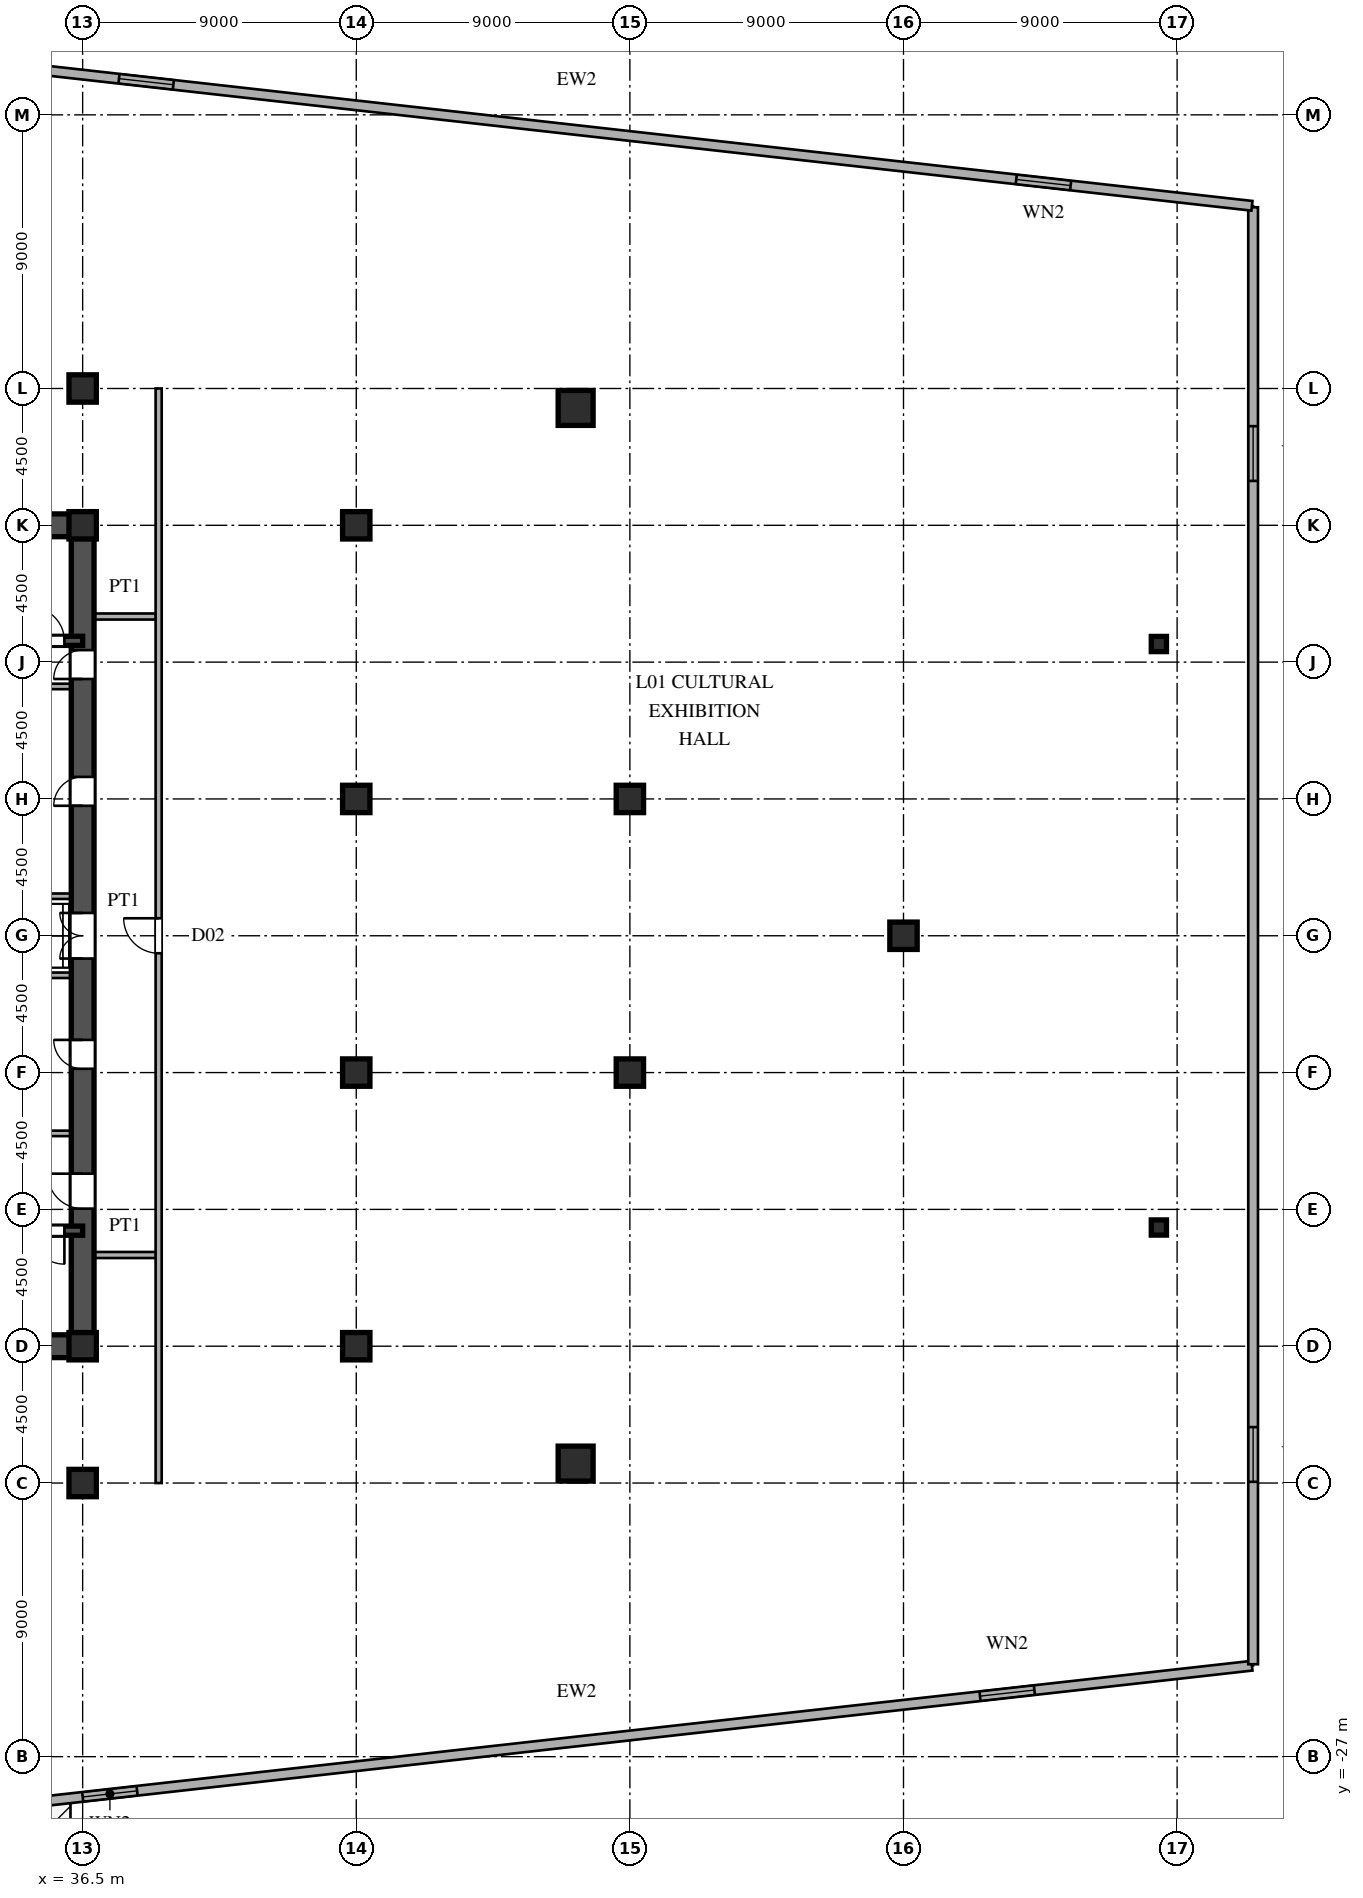
"""IFC4 building model, lengths in metres.
Left out: names, types, materials, properties, quantities, classifications, styles, units other than length and angle.
Written with IfcOpenShell. Run it as: python <this file> out.ifc"""

import sys

from ifc_helpers import new_model, si_unit, direction, frame, frame_2d, origin, origin_2d, place, context, subcontext, project, spatial, rectangle, hollow_rectangle, i_section, extrude, source, transform, mapped, element, fill, save


model = new_model("IFC4")
c1 = context("Model", 3, precision=1e-05, world=origin(), true_north=direction((0.0, 1.0)))
c2 = subcontext(c1, "Body", "Model", "MODEL_VIEW")
j1 = project(units=[si_unit("LENGTHUNIT", "METRE"), si_unit("PLANEANGLEUNIT", "RADIAN")], contexts=[c1])
p1 = place(None, origin())
s1 = spatial("IfcSite", under=j1, at=p1, CompositionType="ELEMENT")
p2 = place(p1, origin())
s2 = spatial("IfcBuilding", under=s1, at=p2, CompositionType="ELEMENT")
p3 = place(p2, frame((0.0, 0.0, 5.4)))
s3 = spatial("IfcBuildingStorey", under=s2, at=p3, CompositionType="ELEMENT", Elevation=5.4)
m1 = source(origin(), c2, "Body", "SweptSolid", [
    extrude(i_section(OverallWidth=0.9, OverallDepth=0.9, WebThickness=0.036, FlangeThickness=0.055, at=origin_2d()), origin(), (0.0, 0.0, 1.0), 4.5),
])
for number, where, z_axis, x_axis in (
    (1, (36.5, -18.0, 0.0), (0.0, 0.0, 1.0), (1.0, 0.0, 0.0)),
    (2, (36.5, -13.5, 0.0), (0.0, 0.0, 1.0), (1.0, 0.0, 0.0)),
    (3, (36.5, 13.5, 0.0), (0.0, 0.0, 1.0), (1.0, 0.0, 0.0)),
    (4, (36.5, 18.0, 0.0), (0.0, 0.0, 1.0), (1.0, 0.0, 0.0)),
    (5, (45.5, -13.5, 0.0), (0.0, 0.0, 1.0), (1.0, 0.0, 0.0)),
    (6, (45.5, -4.5, 0.0), (0.0, 0.0, 1.0), (1.0, 0.0, 0.0)),
    (7, (45.5, 4.5, 0.0), (0.0, 0.0, 1.0), (1.0, 0.0, 0.0)),
    (8, (45.5, 13.5, 0.0), (0.0, 0.0, 1.0), (1.0, 0.0, 0.0)),
    (9, (54.5, -4.5, 0.0), (0.0, 0.0, 1.0), (1.0, 0.0, 0.0)),
    (10, (54.5, 4.5, 0.0), (0.0, 0.0, 1.0), (1.0, 0.0, 0.0)),
    (11, (63.5, 0.0, 0.0), (0.0, 0.0, 1.0), (1.0, 0.0, 0.0)),
):
    element("IfcColumn", number, at=place(p3, frame(where, z_axis=z_axis, x_axis=x_axis)), inside=s3, PredefinedType="COLUMN", context=c2, shape_type="MappedRepresentation", body=[
        mapped(m1, transform((0.0, 0.0, 0.0), scale=1.0)),
    ])
m2 = source(origin(), c2, "Body", "SweptSolid", [
    extrude(hollow_rectangle(XDim=0.5, YDim=0.5, WallThickness=0.02, at=origin_2d()), origin(), (0.0, 0.0, 1.0), 4.5),
])
for number, where, z_axis, x_axis in (
    (12, (71.9, -9.596, 0.0), (0.0, 0.0, 1.0), (1.0, 0.0, 0.0)),
    (13, (71.9, 9.596, 0.0), (0.0, 0.0, 1.0), (1.0, 0.0, 0.0)),
):
    element("IfcColumn", number, at=place(p3, frame(where, z_axis=z_axis, x_axis=x_axis)), inside=s3, PredefinedType="COLUMN", context=c2, shape_type="MappedRepresentation", body=[
        mapped(m2, transform((0.0, 0.0, 0.0), scale=1.0)),
    ])
m3 = source(origin(), c2, "Body", "SweptSolid", [
    extrude(hollow_rectangle(XDim=1.15, YDim=1.15, WallThickness=0.048, at=origin_2d()), origin(), (0.0, 0.0, 1.0), 4.5),
])
for number, where, z_axis, x_axis in (
    (14, (52.716, -17.361, 0.0), (0.0, 0.0, 1.0), (1.0, 0.0, 0.0)),
    (15, (52.716, 17.361, 0.0), (0.0, 0.0, 1.0), (1.0, 0.0, 0.0)),
):
    element("IfcColumn", number, at=place(p3, frame(where, z_axis=z_axis, x_axis=x_axis)), inside=s3, PredefinedType="COLUMN", context=c2, shape_type="MappedRepresentation", body=[
        mapped(m3, transform((0.0, 0.0, 0.0), scale=1.0)),
    ])
p4 = place(p3, frame((30.54, -28.996, 0.0), z_axis=(0.0, 0.0, 1.0), x_axis=(0.993746430789, 0.111660338952, 0.0)))
e16 = element("IfcWall", 16, at=p4, inside=s3, PredefinedType="SOLIDWALL", context=c2, shape_type="SweptSolid", body=[
    extrude(rectangle(XDim=44.7, YDim=0.32, at=frame_2d((22.35, 0.0))), origin(), (0.0, 0.0, 1.0), 4.22),
])
p5 = place(p4, frame((6.0, 0.0, 0.85)))
e17 = element("IfcOpeningElement", 17, at=p5, cuts=e16, PredefinedType="OPENING", context=c2, shape_type="SweptSolid", body=[
    extrude(rectangle(XDim=1.8, YDim=2.0, at=frame_2d((0.9, 1.0))), frame((0.0, 0.17, 0.0), z_axis=(0.0, -1.0, 0.0), x_axis=(1.0, 0.0, 0.0)), (0.0, 0.0, 1.0), 0.34),
])
p6 = place(p4, frame((35.7, 0.0, 0.85)))
e18 = element("IfcOpeningElement", 18, at=p6, cuts=e16, PredefinedType="OPENING", context=c2, shape_type="SweptSolid", body=[
    extrude(rectangle(XDim=1.8, YDim=2.0, at=frame_2d((0.9, 1.0))), frame((0.0, 0.17, 0.0), z_axis=(0.0, -1.0, 0.0), x_axis=(1.0, 0.0, 0.0)), (0.0, 0.0, 1.0), 0.34),
])
p7 = place(p3, frame((75.0, -23.96, 0.0), z_axis=(0.0, 0.0, 1.0), x_axis=(0.0, 1.0, 0.0)))
e19 = element("IfcWall", 19, at=p7, inside=s3, PredefinedType="SOLIDWALL", context=c2, shape_type="SweptSolid", body=[
    extrude(rectangle(XDim=47.92, YDim=0.32, at=frame_2d((23.96, 0.0))), origin(), (0.0, 0.0, 1.0), 4.22),
])
p8 = place(p7, frame((6.0, 0.0, 0.85)))
e20 = element("IfcOpeningElement", 20, at=p8, cuts=e19, PredefinedType="OPENING", context=c2, shape_type="SweptSolid", body=[
    extrude(rectangle(XDim=1.8, YDim=2.0, at=frame_2d((0.9, 1.0))), frame((0.0, 0.17, 0.0), z_axis=(0.0, -1.0, 0.0), x_axis=(1.0, 0.0, 0.0)), (0.0, 0.0, 1.0), 0.34),
])
p9 = place(p7, frame((38.92, 0.0, 0.85)))
e21 = element("IfcOpeningElement", 21, at=p9, cuts=e19, PredefinedType="OPENING", context=c2, shape_type="SweptSolid", body=[
    extrude(rectangle(XDim=1.8, YDim=2.0, at=frame_2d((0.9, 1.0))), frame((0.0, 0.17, 0.0), z_axis=(0.0, -1.0, 0.0), x_axis=(1.0, 0.0, 0.0)), (0.0, 0.0, 1.0), 0.34),
])
p10 = place(p3, frame((74.96, 24.004, 0.0), z_axis=(0.0, 0.0, 1.0), x_axis=(-0.993746430789, 0.111660338952, 0.0)))
e22 = element("IfcWall", 22, at=p10, inside=s3, PredefinedType="SOLIDWALL", context=c2, shape_type="SweptSolid", body=[
    extrude(rectangle(XDim=44.7, YDim=0.32, at=frame_2d((22.35, 0.0))), origin(), (0.0, 0.0, 1.0), 4.22),
])
p11 = place(p10, frame((6.0, 0.0, 0.85)))
e23 = element("IfcOpeningElement", 23, at=p11, cuts=e22, PredefinedType="OPENING", context=c2, shape_type="SweptSolid", body=[
    extrude(rectangle(XDim=1.8, YDim=2.0, at=frame_2d((0.9, 1.0))), frame((0.0, 0.17, 0.0), z_axis=(0.0, -1.0, 0.0), x_axis=(1.0, 0.0, 0.0)), (0.0, 0.0, 1.0), 0.34),
])
p12 = place(p10, frame((35.7, 0.0, 0.85)))
e24 = element("IfcOpeningElement", 24, at=p12, cuts=e22, PredefinedType="OPENING", context=c2, shape_type="SweptSolid", body=[
    extrude(rectangle(XDim=1.8, YDim=2.0, at=frame_2d((0.9, 1.0))), frame((0.0, 0.17, 0.0), z_axis=(0.0, -1.0, 0.0), x_axis=(1.0, 0.0, 0.0)), (0.0, 0.0, 1.0), 0.34),
])
for number, where, z_axis, x_axis in (
    (25, (27.5, -13.5, 0.0), (0.0, 0.0, 1.0), (1.0, 0.0, 0.0)),
    (26, (27.5, 13.5, 0.0), (0.0, 0.0, 1.0), (1.0, 0.0, 0.0)),
):
    element("IfcWall", number, at=place(p3, frame(where, z_axis=z_axis, x_axis=x_axis)), inside=s3, PredefinedType="SHEAR", context=c2, shape_type="SweptSolid", body=[
        extrude(rectangle(XDim=9.0, YDim=0.75, at=frame_2d((4.5, 0.0))), origin(), (0.0, 0.0, 1.0), 4.22),
    ])
p13 = place(p3, frame((36.5, -13.65, 0.0), z_axis=(0.0, 0.0, 1.0), x_axis=(0.0, 1.0, 0.0)))
e27 = element("IfcWall", 27, at=p13, inside=s3, PredefinedType="SHEAR", context=c2, shape_type="SweptSolid", body=[
    extrude(rectangle(XDim=7.15, YDim=0.75, at=frame_2d((3.575, 0.0))), origin(), (0.0, 0.0, 1.0), 4.22),
])
p14 = place(p13, frame((4.675, 0.0, 0.0)))
e28 = element("IfcOpeningElement", 28, at=p14, cuts=e27, PredefinedType="OPENING", context=c2, shape_type="SweptSolid", body=[
    extrude(rectangle(XDim=1.15, YDim=2.2, at=frame_2d((0.575, 1.1))), frame((0.0, 0.385, 0.0), z_axis=(0.0, -1.0, 0.0), x_axis=(1.0, 0.0, 0.0)), (0.0, 0.0, 1.0), 0.77),
])
p15 = place(p3, frame((36.5, -1.3, 0.0), z_axis=(0.0, 0.0, 1.0), x_axis=(0.0, 1.0, 0.0)))
e29 = element("IfcWall", 29, at=p15, inside=s3, PredefinedType="SHEAR", context=c2, shape_type="SweptSolid", body=[
    extrude(rectangle(XDim=2.6, YDim=0.75, at=frame_2d((1.3, 0.0))), origin(), (0.0, 0.0, 1.0), 4.22),
])
p16 = place(p15, frame((0.55, 0.0, 0.0)))
e30 = element("IfcOpeningElement", 30, at=p16, cuts=e29, PredefinedType="OPENING", context=c2, shape_type="SweptSolid", body=[
    extrude(rectangle(XDim=1.5, YDim=2.3, at=frame_2d((0.75, 1.15))), frame((0.0, 0.385, 0.0), z_axis=(0.0, -1.0, 0.0), x_axis=(1.0, 0.0, 0.0)), (0.0, 0.0, 1.0), 0.77),
])
p17 = place(p3, frame((36.5, 8.2, 0.0), z_axis=(0.0, 0.0, 1.0), x_axis=(0.0, 1.0, 0.0)))
e31 = element("IfcWall", 31, at=p17, inside=s3, PredefinedType="SHEAR", context=c2, shape_type="SweptSolid", body=[
    extrude(rectangle(XDim=5.45, YDim=0.75, at=frame_2d((2.725, 0.0))), origin(), (0.0, 0.0, 1.0), 4.22),
])
p18 = place(p17, frame((0.245, 0.0, 0.0)))
e32 = element("IfcOpeningElement", 32, at=p18, cuts=e31, PredefinedType="OPENING", context=c2, shape_type="SweptSolid", body=[
    extrude(rectangle(XDim=0.95, YDim=2.15, at=frame_2d((0.475, 1.075))), frame((0.0, 0.385, 0.0), z_axis=(0.0, -1.0, 0.0), x_axis=(1.0, 0.0, 0.0)), (0.0, 0.0, 1.0), 0.77),
])
p19 = place(p3, frame((36.5, -6.5, 0.0), z_axis=(0.0, 0.0, 1.0), x_axis=(0.0, 1.0, 0.0)))
e33 = element("IfcWall", 33, at=p19, inside=s3, PredefinedType="SHEAR", context=c2, shape_type="SweptSolid", body=[
    extrude(rectangle(XDim=5.2, YDim=0.75, at=frame_2d((2.6, 0.0))), origin(), (0.0, 0.0, 1.0), 4.22),
])
p20 = place(p19, frame((2.125, 0.0, 0.0)))
e34 = element("IfcOpeningElement", 34, at=p20, cuts=e33, PredefinedType="OPENING", context=c2, shape_type="SweptSolid", body=[
    extrude(rectangle(XDim=0.95, YDim=2.15, at=frame_2d((0.475, 1.075))), frame((0.0, 0.385, 0.0), z_axis=(0.0, -1.0, 0.0), x_axis=(1.0, 0.0, 0.0)), (0.0, 0.0, 1.0), 0.77),
])
p21 = place(p3, frame((36.5, 1.3, 0.0), z_axis=(0.0, 0.0, 1.0), x_axis=(0.0, 1.0, 0.0)))
e35 = element("IfcWall", 35, at=p21, inside=s3, PredefinedType="SHEAR", context=c2, shape_type="SweptSolid", body=[
    extrude(rectangle(XDim=6.9, YDim=0.75, at=frame_2d((3.45, 0.0))), origin(), (0.0, 0.0, 1.0), 4.22),
])
p22 = place(p21, frame((2.975, 0.0, 0.0)))
e36 = element("IfcOpeningElement", 36, at=p22, cuts=e35, PredefinedType="OPENING", context=c2, shape_type="SweptSolid", body=[
    extrude(rectangle(XDim=0.95, YDim=2.15, at=frame_2d((0.475, 1.075))), frame((0.0, 0.385, 0.0), z_axis=(0.0, -1.0, 0.0), x_axis=(1.0, 0.0, 0.0)), (0.0, 0.0, 1.0), 0.77),
])
p23 = place(p3, frame((27.5, -9.7, 0.0), z_axis=(0.0, 0.0, 1.0), x_axis=(1.0, 0.0, 0.0)))
e37 = element("IfcWall", 37, at=p23, inside=s3, PredefinedType="SHEAR", context=c2, shape_type="SweptSolid", body=[
    extrude(rectangle(XDim=9.0, YDim=0.3, at=frame_2d((4.5, 0.0))), origin(), (0.0, 0.0, 1.0), 4.22),
])
p24 = place(p23, frame((7.3, 0.0, 0.0)))
e38 = element("IfcOpeningElement", 38, at=p24, cuts=e37, PredefinedType="OPENING", context=c2, shape_type="SweptSolid", body=[
    extrude(rectangle(XDim=1.1, YDim=2.2, at=frame_2d((0.55, 1.1))), frame((0.0, 0.16, 0.0), z_axis=(0.0, -1.0, 0.0), x_axis=(1.0, 0.0, 0.0)), (0.0, 0.0, 1.0), 0.32),
])
p25 = place(p3, frame((27.5, 9.7, 0.0), z_axis=(0.0, 0.0, 1.0), x_axis=(1.0, 0.0, 0.0)))
e39 = element("IfcWall", 39, at=p25, inside=s3, PredefinedType="SHEAR", context=c2, shape_type="SweptSolid", body=[
    extrude(rectangle(XDim=9.0, YDim=0.3, at=frame_2d((4.5, 0.0))), origin(), (0.0, 0.0, 1.0), 4.22),
])
p26 = place(p25, frame((7.3, 0.0, 0.0)))
e40 = element("IfcOpeningElement", 40, at=p26, cuts=e39, PredefinedType="OPENING", context=c2, shape_type="SweptSolid", body=[
    extrude(rectangle(XDim=1.1, YDim=2.2, at=frame_2d((0.55, 1.1))), frame((0.0, 0.16, 0.0), z_axis=(0.0, -1.0, 0.0), x_axis=(1.0, 0.0, 0.0)), (0.0, 0.0, 1.0), 0.32),
])
for number, where, z_axis, x_axis in (
    (41, (30.45, -6.5, 0.0), (0.0, 0.0, 1.0), (1.0, 0.0, 0.0)),
    (42, (30.45, 8.2, 0.0), (0.0, 0.0, 1.0), (1.0, 0.0, 0.0)),
):
    element("IfcWall", number, at=place(p3, frame(where, z_axis=z_axis, x_axis=x_axis)), inside=s3, PredefinedType="PARTITIONING", context=c2, shape_type="SweptSolid", body=[
        extrude(rectangle(XDim=5.7, YDim=0.18, at=frame_2d((2.85, 0.0))), origin(), (0.0, 0.0, 1.0), 4.22),
    ])
for number, where, z_axis, x_axis in (
    (43, (33.2, -1.3, 0.0), (0.0, 0.0, 1.0), (1.0, 0.0, 0.0)),
    (44, (33.2, 1.3, 0.0), (0.0, 0.0, 1.0), (1.0, 0.0, 0.0)),
):
    element("IfcWall", number, at=place(p3, frame(where, z_axis=z_axis, x_axis=x_axis)), inside=s3, PredefinedType="PARTITIONING", context=c2, shape_type="SweptSolid", body=[
        extrude(rectangle(XDim=2.95, YDim=0.18, at=frame_2d((1.475, 0.0))), origin(), (0.0, 0.0, 1.0), 4.22),
    ])
for number, where, z_axis, x_axis in (
    (45, (36.88, -10.5, 0.0), (0.0, 0.0, 1.0), (1.0, 0.0, 0.0)),
    (46, (36.88, 10.5, 0.0), (0.0, 0.0, 1.0), (1.0, 0.0, 0.0)),
):
    element("IfcWall", number, at=place(p3, frame(where, z_axis=z_axis, x_axis=x_axis)), inside=s3, PredefinedType="PARTITIONING", context=c2, shape_type="SweptSolid", body=[
        extrude(rectangle(XDim=2.035, YDim=0.2, at=frame_2d((1.018, 0.0))), origin(), (0.0, 0.0, 1.0), 4.22),
    ])
p27 = place(p3, frame((39.0, -18.0, 0.0), z_axis=(0.0, 0.0, 1.0), x_axis=(0.0, 1.0, 0.0)))
e47 = element("IfcWall", 47, at=p27, inside=s3, PredefinedType="PARTITIONING", context=c2, shape_type="SweptSolid", body=[
    extrude(rectangle(XDim=36.0, YDim=0.2, at=frame_2d((18.0, 0.0))), origin(), (0.0, 0.0, 1.0), 4.22),
])
p28 = place(p27, frame((17.425, 0.0, 0.0)))
e48 = element("IfcOpeningElement", 48, at=p28, cuts=e47, PredefinedType="OPENING", context=c2, shape_type="SweptSolid", body=[
    extrude(rectangle(XDim=1.15, YDim=2.2, at=frame_2d((0.575, 1.1))), frame((0.0, 0.11, 0.0), z_axis=(0.0, -1.0, 0.0), x_axis=(1.0, 0.0, 0.0)), (0.0, 0.0, 1.0), 0.22),
])
m4 = source(origin(), c2, "Body", "SweptSolid", [
    extrude(rectangle(XDim=1.8, YDim=2.0, at=frame_2d((0.9, 1.0))), frame((0.0, 0.03, 0.0), z_axis=(0.0, -1.0, 0.0), x_axis=(1.0, 0.0, 0.0)), (0.0, 0.0, 1.0), 0.06),
])
p29 = place(p5, origin())
e49 = element("IfcWindow", 49, at=p29, inside=s3, PartitioningType="SINGLE_PANEL", PredefinedType="WINDOW", context=c2, shape_type="MappedRepresentation", body=[
    mapped(m4, transform((0.0, 0.0, 0.0), scale=1.0)),
])
fill(e17, e49)
p30 = place(p6, origin())
e50 = element("IfcWindow", 50, at=p30, inside=s3, PartitioningType="SINGLE_PANEL", PredefinedType="WINDOW", context=c2, shape_type="MappedRepresentation", body=[
    mapped(m4, transform((0.0, 0.0, 0.0), scale=1.0)),
])
fill(e18, e50)
p31 = place(p8, origin())
e51 = element("IfcWindow", 51, at=p31, inside=s3, PartitioningType="SINGLE_PANEL", PredefinedType="WINDOW", context=c2, shape_type="MappedRepresentation", body=[
    mapped(m4, transform((0.0, 0.0, 0.0), scale=1.0)),
])
fill(e20, e51)
p32 = place(p9, origin())
e52 = element("IfcWindow", 52, at=p32, inside=s3, PartitioningType="SINGLE_PANEL", PredefinedType="WINDOW", context=c2, shape_type="MappedRepresentation", body=[
    mapped(m4, transform((0.0, 0.0, 0.0), scale=1.0)),
])
fill(e21, e52)
p33 = place(p11, origin())
e53 = element("IfcWindow", 53, at=p33, inside=s3, PartitioningType="SINGLE_PANEL", PredefinedType="WINDOW", context=c2, shape_type="MappedRepresentation", body=[
    mapped(m4, transform((0.0, 0.0, 0.0), scale=1.0)),
])
fill(e23, e53)
p34 = place(p12, origin())
e54 = element("IfcWindow", 54, at=p34, inside=s3, PartitioningType="SINGLE_PANEL", PredefinedType="WINDOW", context=c2, shape_type="MappedRepresentation", body=[
    mapped(m4, transform((0.0, 0.0, 0.0), scale=1.0)),
])
fill(e24, e54)
m5 = source(origin(), c2, "Body", "SweptSolid", [
    extrude(rectangle(XDim=1.15, YDim=2.2, at=frame_2d((0.575, 1.1))), frame((0.0, 0.025, 0.0), z_axis=(0.0, -1.0, 0.0), x_axis=(1.0, 0.0, 0.0)), (0.0, 0.0, 1.0), 0.05),
])
p35 = place(p14, origin())
e55 = element("IfcDoor", 55, at=p35, inside=s3, OperationType="SINGLE_SWING_RIGHT", PredefinedType="DOOR", context=c2, shape_type="MappedRepresentation", body=[
    mapped(m5, transform((0.0, 0.0, 0.0), scale=1.0)),
])
fill(e28, e55)
m6 = source(origin(), c2, "Body", "SweptSolid", [
    extrude(rectangle(XDim=1.5, YDim=2.3, at=frame_2d((0.75, 1.15))), frame((0.0, 0.025, 0.0), z_axis=(0.0, -1.0, 0.0), x_axis=(1.0, 0.0, 0.0)), (0.0, 0.0, 1.0), 0.05),
])
p36 = place(p16, origin())
e56 = element("IfcDoor", 56, at=p36, inside=s3, OperationType="DOUBLE_SWING_LEFT", PredefinedType="DOOR", context=c2, shape_type="MappedRepresentation", body=[
    mapped(m6, transform((0.0, 0.0, 0.0), scale=1.0)),
])
fill(e30, e56)
m7 = source(origin(), c2, "Body", "SweptSolid", [
    extrude(rectangle(XDim=0.95, YDim=2.15, at=frame_2d((0.475, 1.075))), frame((0.0, 0.025, 0.0), z_axis=(0.0, -1.0, 0.0), x_axis=(1.0, 0.0, 0.0)), (0.0, 0.0, 1.0), 0.05),
])
p37 = place(p18, origin())
e57 = element("IfcDoor", 57, at=p37, inside=s3, OperationType="SINGLE_SWING_LEFT", PredefinedType="DOOR", context=c2, shape_type="MappedRepresentation", body=[
    mapped(m7, transform((0.0, 0.0, 0.0), scale=1.0)),
])
fill(e32, e57)
p38 = place(p20, origin())
e58 = element("IfcDoor", 58, at=p38, inside=s3, OperationType="SINGLE_SWING_RIGHT", PredefinedType="DOOR", context=c2, shape_type="MappedRepresentation", body=[
    mapped(m7, transform((0.0, 0.0, 0.0), scale=1.0)),
])
fill(e34, e58)
p39 = place(p22, origin())
e59 = element("IfcDoor", 59, at=p39, inside=s3, OperationType="SINGLE_SWING_LEFT", PredefinedType="DOOR", context=c2, shape_type="MappedRepresentation", body=[
    mapped(m7, transform((0.0, 0.0, 0.0), scale=1.0)),
])
fill(e36, e59)
m8 = source(origin(), c2, "Body", "SweptSolid", [
    extrude(rectangle(XDim=1.1, YDim=2.2, at=frame_2d((0.55, 1.1))), frame((0.0, 0.025, 0.0), z_axis=(0.0, -1.0, 0.0), x_axis=(1.0, 0.0, 0.0)), (0.0, 0.0, 1.0), 0.05),
])
p40 = place(p24, frame((1.1, 0.0, 0.0), z_axis=(0.0, 0.0, 1.0), x_axis=(-1.0, 0.0, 0.0)))
e60 = element("IfcDoor", 60, at=p40, inside=s3, OperationType="SINGLE_SWING_RIGHT", PredefinedType="DOOR", context=c2, shape_type="MappedRepresentation", body=[
    mapped(m8, transform((0.0, 0.0, 0.0), scale=1.0)),
])
fill(e38, e60)
p41 = place(p26, origin())
e61 = element("IfcDoor", 61, at=p41, inside=s3, OperationType="SINGLE_SWING_LEFT", PredefinedType="DOOR", context=c2, shape_type="MappedRepresentation", body=[
    mapped(m8, transform((0.0, 0.0, 0.0), scale=1.0)),
])
fill(e40, e61)
p42 = place(p28, origin())
e62 = element("IfcDoor", 62, at=p42, inside=s3, OperationType="SINGLE_SWING_RIGHT", PredefinedType="DOOR", context=c2, shape_type="MappedRepresentation", body=[
    mapped(m5, transform((0.0, 0.0, 0.0), scale=1.0)),
])
fill(e48, e62)
save(model, sys.argv[1])
